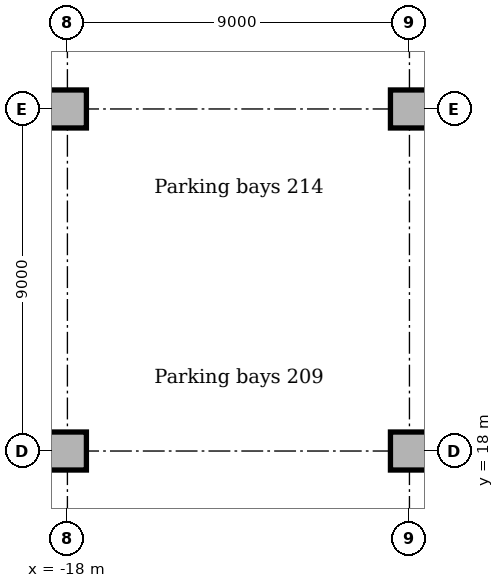
"""IFC4 building model, lengths in metres.
Left out: names, types, materials, properties, quantities, classifications, styles, units other than length and angle.
Written with IfcOpenShell. Run it as: python <this file> out.ifc"""

import sys

from ifc_helpers import new_model, si_unit, direction, frame, origin, origin_2d, place, context, subcontext, project, spatial, rectangle, extrude, element, save


model = new_model("IFC4")
c1 = context("Model", 3, precision=1e-05, world=origin(), true_north=direction((0.0, 1.0)))
c2 = subcontext(c1, "Body", "Model", "MODEL_VIEW")
j1 = project(units=[si_unit("LENGTHUNIT", "METRE"), si_unit("PLANEANGLEUNIT", "RADIAN")], contexts=[c1])
p1 = place(None, origin())
s1 = spatial("IfcSite", under=j1, at=p1, CompositionType="ELEMENT")
p2 = place(p1, origin())
s2 = spatial("IfcBuilding", under=s1, at=p2, CompositionType="ELEMENT")
p3 = place(p2, frame((0.0, 0.0, -9.5)))
s3 = spatial("IfcBuildingStorey", under=s2, at=p3, CompositionType="ELEMENT", Elevation=-9.5)
for number, where, z_axis, x_axis in (
    (1, (-18.0, 18.0, 0.0), (0.0, 0.0, 1.0), (1.0, 0.0, 0.0)),
    (2, (-18.0, 27.0, 0.0), (0.0, 0.0, 1.0), (1.0, 0.0, 0.0)),
    (3, (-9.0, 18.0, 0.0), (0.0, 0.0, 1.0), (1.0, 0.0, 0.0)),
    (4, (-9.0, 27.0, 0.0), (0.0, 0.0, 1.0), (1.0, 0.0, 0.0)),
):
    element("IfcColumn", number, at=place(p3, frame(where, z_axis=z_axis, x_axis=x_axis)), inside=s3, PredefinedType="COLUMN", context=c2, shape_type="SweptSolid", body=[
        extrude(rectangle(XDim=1.0, YDim=1.0, at=origin_2d()), origin(), (0.0, 0.0, 1.0), 4.15),
    ])
save(model, sys.argv[1])
